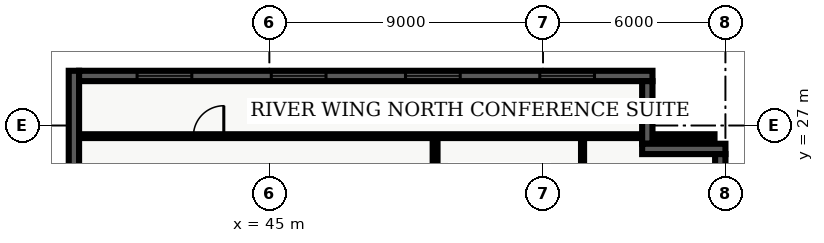
"""IFC4 building model, lengths in metres.
Left out: names, types, materials, properties, quantities, classifications, styles, units other than length and angle.
Written with IfcOpenShell. Run it as: python <this file> out.ifc"""

import sys

from ifc_helpers import new_model, entity, si_unit, converted_unit, direction, frame, origin_with_axes, origin_2d_with_axis, place, context, subcontext, project, spatial, polyline, rectangle, outline, extrude, element, fill, save


model = new_model("IFC4")
c1 = context("Model", 3, precision=1e-05, world=origin_with_axes(), true_north=direction((0.0, 1.0)))
c2 = subcontext(c1, "Body", "Model", "MODEL_VIEW")
j1 = project(units=[si_unit("LENGTHUNIT", "METRE"), converted_unit("PLANEANGLEUNIT", "DEGREE", entity("IfcPlaneAngleMeasure", 0.017), si_unit("PLANEANGLEUNIT", "RADIAN"), dimensions=[0, 0, 0, 0, 0, 0, 0])], contexts=[c1])
p1 = place(None, origin_with_axes())
s1 = spatial("IfcSite", under=j1, at=p1, CompositionType="ELEMENT")
p2 = place(p1, origin_with_axes())
s2 = spatial("IfcBuilding", under=s1, at=p2, CompositionType="ELEMENT")
p3 = place(p2, frame((0.0, 0.0, 192.6), z_axis=(0.0, 0.0, 1.0), x_axis=(1.0, 0.0, 0.0)))
s3 = spatial("IfcBuildingStorey", under=s2, at=p3, CompositionType="ELEMENT", Elevation=192.6)
p4 = place(p3, frame((50.45, 7.85, 0.0), z_axis=(0.0, 0.0, 1.0), x_axis=(0.0, 1.0, 0.0)))
e1 = element("IfcWall", 1, at=p4, inside=s3, PredefinedType="PARTITIONING", context=c2, shape_type="SweptSolid", body=[
    extrude(outline(polyline([(0.0, -0.08), (18.8, -0.08), (18.8, 0.08), (0.0, 0.08), (0.0, -0.08)])), origin_with_axes(), (0.0, 0.0, 1.0), 2.7),
])
p5 = place(p4, frame((5.84, 0.0, 0.0), z_axis=(0.0, 0.0, 1.0), x_axis=(1.0, 0.0, 0.0)))
e2 = element("IfcOpeningElement", 2, at=p5, cuts=e1, PredefinedType="OPENING", context=c2, shape_type="SweptSolid", body=[
    extrude(rectangle(XDim=1.0, YDim=0.18, at=origin_2d_with_axis()), origin_with_axes(), (0.0, 0.0, 1.0), 2.15),
])
p6 = place(p4, frame((11.293, 0.0, 0.0), z_axis=(0.0, 0.0, 1.0), x_axis=(1.0, 0.0, 0.0)))
e3 = element("IfcOpeningElement", 3, at=p6, cuts=e1, PredefinedType="OPENING", context=c2, shape_type="SweptSolid", body=[
    extrude(rectangle(XDim=1.0, YDim=0.18, at=origin_2d_with_axis()), origin_with_axes(), (0.0, 0.0, 1.0), 2.15),
])
p7 = place(p4, frame((14.169, 0.0, 0.0), z_axis=(0.0, 0.0, 1.0), x_axis=(1.0, 0.0, 0.0)))
e4 = element("IfcOpeningElement", 4, at=p7, cuts=e1, PredefinedType="OPENING", context=c2, shape_type="SweptSolid", body=[
    extrude(rectangle(XDim=1.0, YDim=0.18, at=origin_2d_with_axis()), origin_with_axes(), (0.0, 0.0, 1.0), 2.15),
])
p8 = place(p3, frame((38.735, 26.65, 0.0), z_axis=(0.0, 0.0, 1.0), x_axis=(1.0, 0.0, 0.0)))
e5 = element("IfcWall", 5, at=p8, inside=s3, PredefinedType="PARTITIONING", context=c2, shape_type="SweptSolid", body=[
    extrude(outline(polyline([(0.0, -0.062), (20.905, -0.062), (20.905, 0.062), (0.0, 0.062), (0.0, -0.062)])), origin_with_axes(), (0.0, 0.0, 1.0), 2.7),
])
p9 = place(p8, frame((4.265, 0.0, 0.0), z_axis=(0.0, 0.0, 1.0), x_axis=(1.0, 0.0, 0.0)))
e6 = element("IfcOpeningElement", 6, at=p9, cuts=e5, PredefinedType="OPENING", context=c2, shape_type="SweptSolid", body=[
    extrude(rectangle(XDim=1.0, YDim=0.145, at=origin_2d_with_axis()), origin_with_axes(), (0.0, 0.0, 1.0), 2.15),
])
p10 = place(p3, frame((55.3, 7.98, 0.0), z_axis=(0.0, 0.0, 1.0), x_axis=(0.0, 1.0, 0.0)))
e7 = element("IfcWall", 7, at=p10, inside=s3, PredefinedType="PARTITIONING", context=c2, shape_type="SweptSolid", body=[
    extrude(outline(polyline([(0.0, -0.05), (18.54, -0.05), (18.54, 0.05), (0.0, 0.05), (0.0, -0.05)])), origin_with_axes(), (0.0, 0.0, 1.0), 2.7),
])
p11 = place(p10, frame((1.776, 0.0, 0.0), z_axis=(0.0, 0.0, 1.0), x_axis=(1.0, 0.0, 0.0)))
e8 = element("IfcOpeningElement", 8, at=p11, cuts=e7, PredefinedType="OPENING", context=c2, shape_type="SweptSolid", body=[
    extrude(rectangle(XDim=0.95, YDim=0.12, at=origin_2d_with_axis()), origin_with_axes(), (0.0, 0.0, 1.0), 2.15),
])
p12 = place(p10, frame((5.71, 0.0, 0.0), z_axis=(0.0, 0.0, 1.0), x_axis=(1.0, 0.0, 0.0)))
e9 = element("IfcOpeningElement", 9, at=p12, cuts=e7, PredefinedType="OPENING", context=c2, shape_type="SweptSolid", body=[
    extrude(rectangle(XDim=0.95, YDim=0.12, at=origin_2d_with_axis()), origin_with_axes(), (0.0, 0.0, 1.0), 2.15),
])
p13 = place(p10, frame((10.283, 0.0, 0.0), z_axis=(0.0, 0.0, 1.0), x_axis=(1.0, 0.0, 0.0)))
e10 = element("IfcOpeningElement", 10, at=p13, cuts=e7, PredefinedType="OPENING", context=c2, shape_type="SweptSolid", body=[
    extrude(rectangle(XDim=0.95, YDim=0.12, at=origin_2d_with_axis()), origin_with_axes(), (0.0, 0.0, 1.0), 2.15),
])
p14 = place(p10, frame((15.689, 0.0, 0.0), z_axis=(0.0, 0.0, 1.0), x_axis=(1.0, 0.0, 0.0)))
e11 = element("IfcOpeningElement", 11, at=p14, cuts=e7, PredefinedType="OPENING", context=c2, shape_type="SweptSolid", body=[
    extrude(rectangle(XDim=0.95, YDim=0.12, at=origin_2d_with_axis()), origin_with_axes(), (0.0, 0.0, 1.0), 2.15),
])
p15 = place(p3, frame((38.57, 21.26, 0.0), z_axis=(0.0, 0.0, 1.0), x_axis=(0.0, 1.0, 0.0)))
e12 = element("IfcWall", 12, at=p15, inside=s3, PredefinedType="SOLIDWALL", context=c2, shape_type="SweptSolid", body=[
    extrude(outline(polyline([(0.0, -0.17), (7.54, -0.17), (7.54, 0.17), (0.0, 0.17), (0.0, -0.17)])), origin_with_axes(), (0.0, 0.0, 1.0), 3.66),
])
p16 = place(p3, frame((38.74, 28.63, 0.0), z_axis=(0.0, 0.0, 1.0), x_axis=(1.0, 0.0, 0.0)))
e13 = element("IfcWall", 13, at=p16, inside=s3, PredefinedType="SOLIDWALL", context=c2, shape_type="SweptSolid", body=[
    extrude(outline(polyline([(0.0, -0.17), (18.86, -0.17), (18.86, 0.17), (0.0, 0.17), (0.0, -0.17)])), origin_with_axes(), (0.0, 0.0, 1.0), 3.66),
])
p17 = place(p16, frame((2.808, 0.0, 0.45), z_axis=(0.0, 0.0, 1.0), x_axis=(1.0, 0.0, 0.0)))
e14 = element("IfcOpeningElement", 14, at=p17, cuts=e13, PredefinedType="OPENING", context=c2, shape_type="SweptSolid", body=[
    extrude(rectangle(XDim=1.8, YDim=0.36, at=origin_2d_with_axis()), origin_with_axes(), (0.0, 0.0, 1.0), 2.1),
])
p18 = place(p16, frame((7.222, 0.0, 0.45), z_axis=(0.0, 0.0, 1.0), x_axis=(1.0, 0.0, 0.0)))
e15 = element("IfcOpeningElement", 15, at=p18, cuts=e13, PredefinedType="OPENING", context=c2, shape_type="SweptSolid", body=[
    extrude(rectangle(XDim=1.8, YDim=0.36, at=origin_2d_with_axis()), origin_with_axes(), (0.0, 0.0, 1.0), 2.1),
])
p19 = place(p16, frame((11.637, 0.0, 0.45), z_axis=(0.0, 0.0, 1.0), x_axis=(1.0, 0.0, 0.0)))
e16 = element("IfcOpeningElement", 16, at=p19, cuts=e13, PredefinedType="OPENING", context=c2, shape_type="SweptSolid", body=[
    extrude(rectangle(XDim=1.8, YDim=0.36, at=origin_2d_with_axis()), origin_with_axes(), (0.0, 0.0, 1.0), 2.1),
])
p20 = place(p16, frame((16.053, 0.0, 0.45), z_axis=(0.0, 0.0, 1.0), x_axis=(1.0, 0.0, 0.0)))
e17 = element("IfcOpeningElement", 17, at=p20, cuts=e13, PredefinedType="OPENING", context=c2, shape_type="SweptSolid", body=[
    extrude(rectangle(XDim=1.8, YDim=0.36, at=origin_2d_with_axis()), origin_with_axes(), (0.0, 0.0, 1.0), 2.1),
])
p21 = place(p3, frame((57.43, 28.46, 0.0), z_axis=(0.0, 0.0, 1.0), x_axis=(0.0, -1.0, 0.0)))
e18 = element("IfcWall", 18, at=p21, inside=s3, PredefinedType="SOLIDWALL", context=c2, shape_type="SweptSolid", body=[
    extrude(outline(polyline([(0.0, -0.17), (2.06, -0.17), (2.06, 0.17), (0.0, 0.17), (0.0, -0.17)])), origin_with_axes(), (0.0, 0.0, 1.0), 3.66),
])
p22 = place(p3, frame((57.26, 26.23, 0.0), z_axis=(0.0, 0.0, 1.0), x_axis=(1.0, 0.0, 0.0)))
e19 = element("IfcWall", 19, at=p22, inside=s3, PredefinedType="SOLIDWALL", context=c2, shape_type="SweptSolid", body=[
    extrude(outline(polyline([(0.0, -0.17), (2.74, -0.17), (2.74, 0.17), (0.0, 0.17), (0.0, -0.17)])), origin_with_axes(), (0.0, 0.0, 1.0), 3.66),
])
p23 = place(p3, frame((59.83, 26.06, 0.0), z_axis=(0.0, 0.0, 1.0), x_axis=(0.0, -1.0, 0.0)))
e20 = element("IfcWall", 20, at=p23, inside=s3, PredefinedType="SOLIDWALL", context=c2, shape_type="SweptSolid", body=[
    extrude(outline(polyline([(0.0, -0.17), (23.66, -0.17), (23.66, 0.17), (0.0, 0.17), (0.0, -0.17)])), origin_with_axes(), (0.0, 0.0, 1.0), 3.66),
])
p24 = place(p23, frame((3.696, 0.0, 0.45), z_axis=(0.0, 0.0, 1.0), x_axis=(1.0, 0.0, 0.0)))
e21 = element("IfcOpeningElement", 21, at=p24, cuts=e20, PredefinedType="OPENING", context=c2, shape_type="SweptSolid", body=[
    extrude(rectangle(XDim=1.8, YDim=0.36, at=origin_2d_with_axis()), origin_with_axes(), (0.0, 0.0, 1.0), 2.1),
])
p25 = place(p23, frame((11.83, 0.0, 0.45), z_axis=(0.0, 0.0, 1.0), x_axis=(1.0, 0.0, 0.0)))
e22 = element("IfcOpeningElement", 22, at=p25, cuts=e20, PredefinedType="OPENING", context=c2, shape_type="SweptSolid", body=[
    extrude(rectangle(XDim=1.8, YDim=0.36, at=origin_2d_with_axis()), origin_with_axes(), (0.0, 0.0, 1.0), 2.1),
])
p26 = place(p23, frame((20.364, 0.0, 0.45), z_axis=(0.0, 0.0, 1.0), x_axis=(1.0, 0.0, 0.0)))
e23 = element("IfcOpeningElement", 23, at=p26, cuts=e20, PredefinedType="OPENING", context=c2, shape_type="SweptSolid", body=[
    extrude(rectangle(XDim=1.8, YDim=0.36, at=origin_2d_with_axis()), origin_with_axes(), (0.0, 0.0, 1.0), 2.1),
])
p27 = place(p8, frame((4.265, 0.0, 0.0), z_axis=(0.0, 0.0, 1.0), x_axis=(1.0, 0.0, 0.0)))
e24 = element("IfcDoor", 24, at=p27, inside=s3, OperationType="SINGLE_SWING_RIGHT", PredefinedType="DOOR", context=c2, shape_type="SweptSolid", body=[
    extrude(rectangle(XDim=1.0, YDim=0.075, at=origin_2d_with_axis()), origin_with_axes(), (0.0, 0.0, 1.0), 2.15),
])
fill(e6, e24)
p28 = place(p16, frame((2.808, 0.0, 0.45), z_axis=(0.0, 0.0, 1.0), x_axis=(1.0, 0.0, 0.0)))
e25 = element("IfcWindow", 25, at=p28, inside=s3, PredefinedType="WINDOW", context=c2, shape_type="SweptSolid", body=[
    extrude(rectangle(XDim=1.8, YDim=0.09, at=origin_2d_with_axis()), origin_with_axes(), (0.0, 0.0, 1.0), 2.1),
])
fill(e14, e25)
p29 = place(p16, frame((7.222, 0.0, 0.45), z_axis=(0.0, 0.0, 1.0), x_axis=(1.0, 0.0, 0.0)))
e26 = element("IfcWindow", 26, at=p29, inside=s3, PredefinedType="WINDOW", context=c2, shape_type="SweptSolid", body=[
    extrude(rectangle(XDim=1.8, YDim=0.09, at=origin_2d_with_axis()), origin_with_axes(), (0.0, 0.0, 1.0), 2.1),
])
fill(e15, e26)
p30 = place(p16, frame((11.637, 0.0, 0.45), z_axis=(0.0, 0.0, 1.0), x_axis=(1.0, 0.0, 0.0)))
e27 = element("IfcWindow", 27, at=p30, inside=s3, PredefinedType="WINDOW", context=c2, shape_type="SweptSolid", body=[
    extrude(rectangle(XDim=1.8, YDim=0.09, at=origin_2d_with_axis()), origin_with_axes(), (0.0, 0.0, 1.0), 2.1),
])
fill(e16, e27)
p31 = place(p16, frame((16.053, 0.0, 0.45), z_axis=(0.0, 0.0, 1.0), x_axis=(1.0, 0.0, 0.0)))
e28 = element("IfcWindow", 28, at=p31, inside=s3, PredefinedType="WINDOW", context=c2, shape_type="SweptSolid", body=[
    extrude(rectangle(XDim=1.8, YDim=0.09, at=origin_2d_with_axis()), origin_with_axes(), (0.0, 0.0, 1.0), 2.1),
])
fill(e17, e28)
save(model, sys.argv[1])
